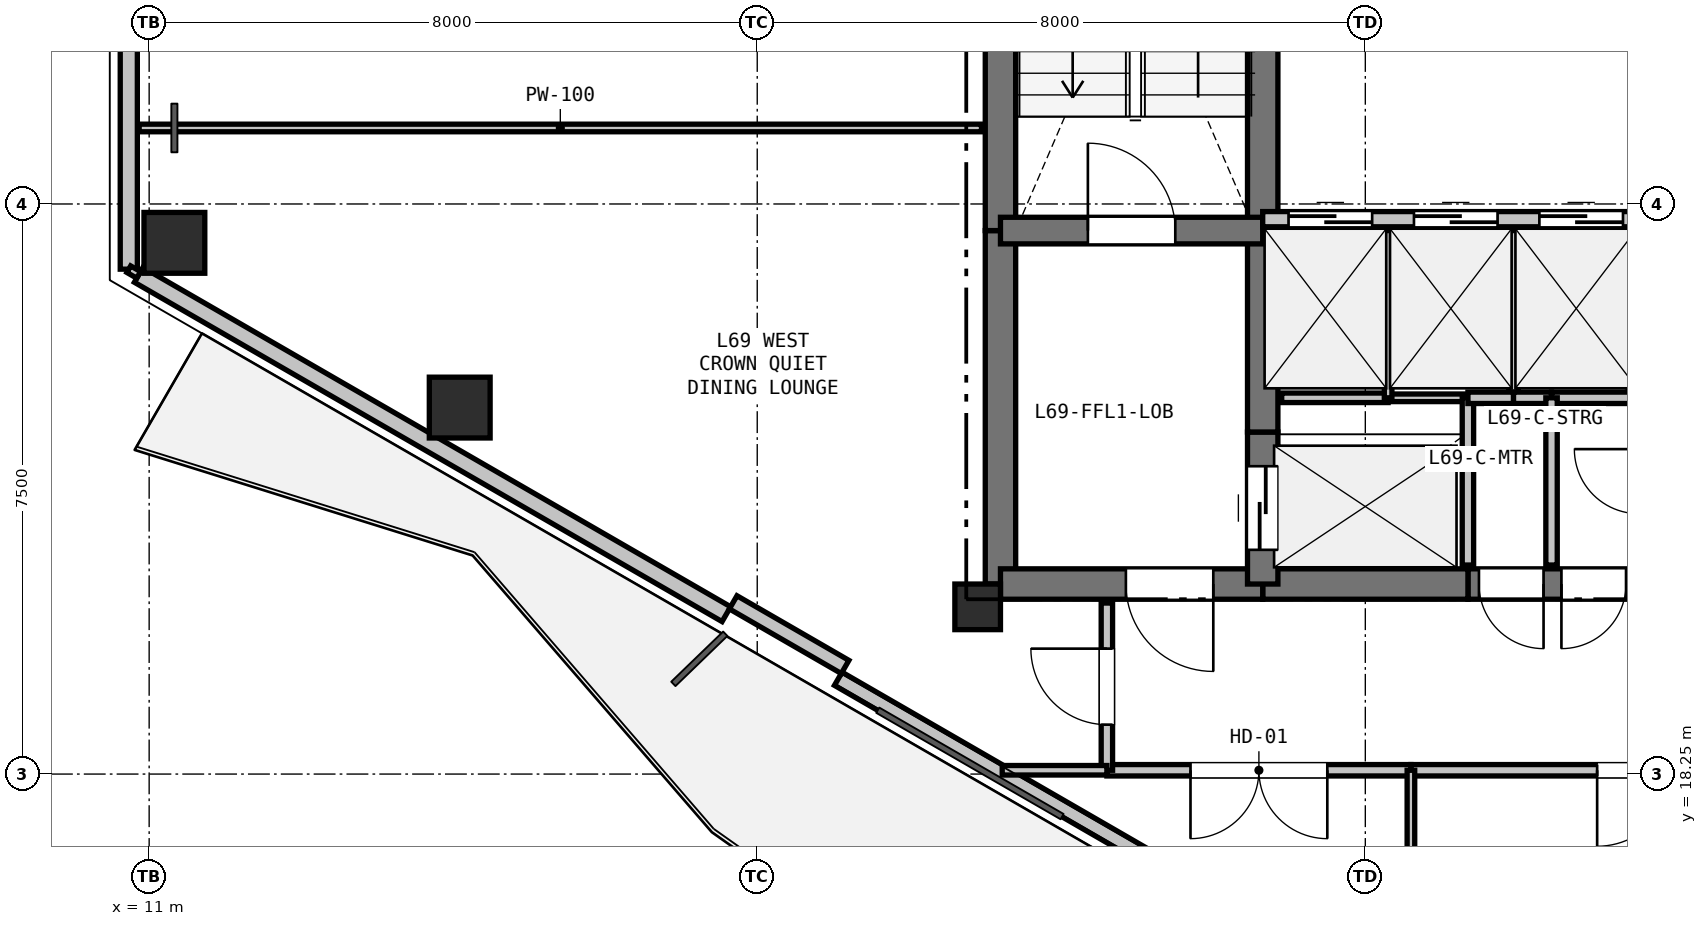
"""IFC4 building model, lengths in metres.
Left out: names, types, materials, properties, quantities, classifications, styles, units other than length and angle.
Written with IfcOpenShell. Run it as: python <this file> out.ifc"""

import sys

from ifc_helpers import new_model, si_unit, direction, frame, frame_2d, origin, origin_2d, place, context, subcontext, project, spatial, rectangle, hollow_rectangle, extrude, element, fill, save


model = new_model("IFC4")
c1 = context("Model", 3, precision=1e-05, world=origin(), true_north=direction((0.0, 1.0)))
c2 = subcontext(c1, "Body", "Model", "MODEL_VIEW")
j1 = project(units=[si_unit("LENGTHUNIT", "METRE"), si_unit("PLANEANGLEUNIT", "RADIAN")], contexts=[c1])
p1 = place(None, origin())
s1 = spatial("IfcSite", under=j1, at=p1, CompositionType="ELEMENT")
p2 = place(p1, origin())
s2 = spatial("IfcBuilding", under=s1, at=p2, CompositionType="ELEMENT")
p3 = place(p2, frame((0.0, 0.0, 246.3)))
s3 = spatial("IfcBuildingStorey", under=s2, at=p3, CompositionType="ELEMENT", Elevation=246.3)
p4 = place(p3, frame((21.9, 20.45, 0.0), z_axis=(0.0, 0.0, 1.0), x_axis=(1.0, 0.0, 0.0)))
e1 = element("IfcColumn", 1, at=p4, inside=s3, PredefinedType="COLUMN", context=c2, shape_type="SweptSolid", body=[
    extrude(rectangle(XDim=0.6, YDim=0.6, at=origin_2d()), origin(), (0.0, 0.0, 1.0), 3.3),
])
for number, where, z_axis, x_axis in (
    (2, (15.086, 23.072, 0.0), (0.0, 0.0, 1.0), (1.0, 0.0, 0.0)),
    (3, (11.332, 25.239, 0.0), (0.0, 0.0, 1.0), (1.0, 0.0, 0.0)),
):
    element("IfcColumn", number, at=place(p3, frame(where, z_axis=z_axis, x_axis=x_axis)), inside=s3, PredefinedType="COLUMN", context=c2, shape_type="SweptSolid", body=[
        extrude(hollow_rectangle(XDim=0.8, YDim=0.8, WallThickness=0.025, at=origin_2d()), origin(), (0.0, 0.0, 1.0), 3.3),
    ])
p5 = place(p3, frame((10.732, 24.892, 0.0), z_axis=(0.0, 0.0, 1.0), x_axis=(0.0, 1.0, 0.0)))
e4 = element("IfcWall", 4, at=p5, inside=s3, PredefinedType="SOLIDWALL", context=c2, shape_type="SweptSolid", body=[
    extrude(rectangle(XDim=3.715, YDim=0.225, at=frame_2d((1.858, 0.0))), origin(), (0.0, 0.0, 1.0), 2.64),
])
p6 = place(p3, frame((27.191, 15.389, 0.0), z_axis=(0.0, 0.0, 1.0), x_axis=(-0.866019557082, 0.500010126649, 0.0)))
e5 = element("IfcWall", 5, at=p6, inside=s3, PredefinedType="PARAPET", context=c2, shape_type="SweptSolid", body=[
    extrude(rectangle(XDim=8.228, YDim=0.2, at=frame_2d((4.114, 0.0))), origin(), (0.0, 0.0, 1.0), 0.2),
])
p7 = place(p3, frame((18.594, 20.354, 0.0), z_axis=(0.0, 0.0, 1.0), x_axis=(-0.866026655105, 0.499997832642, 0.0)))
e6 = element("IfcWall", 6, at=p7, inside=s3, PredefinedType="SOLIDWALL", context=c2, shape_type="SweptSolid", body=[
    extrude(rectangle(XDim=8.928, YDim=0.225, at=frame_2d((4.464, 0.0))), origin(), (0.0, 0.0, 1.0), 2.64),
])
p8 = place(p3, frame((20.156, 19.659, 0.0), z_axis=(0.0, 0.0, 1.0), x_axis=(-0.866025371046, 0.500000056704, 0.0)))
e7 = element("IfcWall", 7, at=p8, inside=s3, PredefinedType="PARAPET", context=c2, shape_type="SweptSolid", body=[
    extrude(rectangle(XDim=1.7, YDim=0.2, at=frame_2d((0.85, 0.0))), origin(), (0.0, 0.0, 1.0), 2.64),
])
p9 = place(p3, frame((22.2, 20.75, 0.0), z_axis=(0.0, 0.0, 1.0), x_axis=(0.0, 1.0, 0.0)))
e8 = element("IfcWall", 8, at=p9, inside=s3, PredefinedType="SHEAR", context=c2, shape_type="SweptSolid", body=[
    extrude(rectangle(XDim=4.65, YDim=0.4, at=frame_2d((2.325, 0.0))), origin(), (0.0, 0.0, 1.0), 3.02),
])
p10 = place(p3, frame((22.2, 25.4, 0.0), z_axis=(0.0, 0.0, 1.0), x_axis=(0.0, 1.0, 0.0)))
e9 = element("IfcWall", 9, at=p10, inside=s3, PredefinedType="SHEAR", context=c2, shape_type="SweptSolid", body=[
    extrude(rectangle(XDim=7.35, YDim=0.4, at=frame_2d((3.675, 0.0))), origin(), (0.0, 0.0, 1.0), 3.02),
])
p11 = place(p3, frame((30.6, 20.75, 0.0), z_axis=(0.0, 0.0, 1.0), x_axis=(-1.0, 0.0, 0.0)))
e10 = element("IfcWall", 10, at=p11, inside=s3, PredefinedType="SHEAR", context=c2, shape_type="SweptSolid", body=[
    extrude(rectangle(XDim=2.25, YDim=0.4, at=frame_2d((1.125, 0.0))), origin(), (0.0, 0.0, 1.0), 3.02),
])
p12 = place(p11, frame((1.255, 0.0, 0.0)))
e11 = element("IfcOpeningElement", 11, at=p12, cuts=e10, PredefinedType="OPENING", context=c2, shape_type="SweptSolid", body=[
    extrude(rectangle(XDim=0.85, YDim=2.1, at=frame_2d((0.425, 1.05))), frame((0.0, 0.21, 0.0), z_axis=(0.0, -1.0, 0.0), x_axis=(1.0, 0.0, 0.0)), (0.0, 0.0, 1.0), 0.42),
])
p13 = place(p11, frame((0.17, 0.0, 0.0)))
e12 = element("IfcOpeningElement", 12, at=p13, cuts=e10, PredefinedType="OPENING", context=c2, shape_type="SweptSolid", body=[
    extrude(rectangle(XDim=0.85, YDim=2.1, at=frame_2d((0.425, 1.05))), frame((0.0, 0.21, 0.0), z_axis=(0.0, -1.0, 0.0), x_axis=(1.0, 0.0, 0.0)), (0.0, 0.0, 1.0), 0.42),
])
p14 = place(p3, frame((28.35, 20.75, 0.0), z_axis=(0.0, 0.0, 1.0), x_axis=(-1.0, 0.0, 0.0)))
e13 = element("IfcWall", 13, at=p14, inside=s3, PredefinedType="SHEAR", context=c2, shape_type="SweptSolid", body=[
    extrude(rectangle(XDim=2.7, YDim=0.4, at=frame_2d((1.35, 0.0))), origin(), (0.0, 0.0, 1.0), 3.02),
])
p15 = place(p3, frame((25.65, 20.75, 0.0), z_axis=(0.0, 0.0, 1.0), x_axis=(-1.0, 0.0, 0.0)))
e14 = element("IfcWall", 14, at=p15, inside=s3, PredefinedType="SHEAR", context=c2, shape_type="SweptSolid", body=[
    extrude(rectangle(XDim=3.45, YDim=0.4, at=frame_2d((1.725, 0.0))), origin(), (0.0, 0.0, 1.0), 3.02),
])
p16 = place(p15, frame((0.65, 0.0, 0.0)))
e15 = element("IfcOpeningElement", 15, at=p16, cuts=e14, PredefinedType="OPENING", context=c2, shape_type="SweptSolid", body=[
    extrude(rectangle(XDim=1.15, YDim=2.15, at=frame_2d((0.575, 1.075))), frame((0.0, 0.21, 0.0), z_axis=(0.0, -1.0, 0.0), x_axis=(1.0, 0.0, 0.0)), (0.0, 0.0, 1.0), 0.42),
])
p17 = place(p3, frame((25.65, 20.75, 0.0), z_axis=(0.0, 0.0, 1.0), x_axis=(0.0, 1.0, 0.0)))
e16 = element("IfcWall", 16, at=p17, inside=s3, PredefinedType="SHEAR", context=c2, shape_type="SweptSolid", body=[
    extrude(rectangle(XDim=2.0, YDim=0.4, at=frame_2d((1.0, 0.0))), origin(), (0.0, 0.0, 1.0), 3.02),
])
p18 = place(p17, frame((0.45, 0.0, 0.0)))
e17 = element("IfcOpeningElement", 17, at=p18, cuts=e16, PredefinedType="OPENING", context=c2, shape_type="SweptSolid", body=[
    extrude(rectangle(XDim=1.1, YDim=2.15, at=frame_2d((0.55, 1.075))), frame((0.0, 0.21, 0.0), z_axis=(0.0, -1.0, 0.0), x_axis=(1.0, 0.0, 0.0)), (0.0, 0.0, 1.0), 0.42),
])
p19 = place(p3, frame((25.65, 22.75, 0.0), z_axis=(0.0, 0.0, 1.0), x_axis=(0.0, 1.0, 0.0)))
e18 = element("IfcWall", 18, at=p19, inside=s3, PredefinedType="SHEAR", context=c2, shape_type="SweptSolid", body=[
    extrude(rectangle(XDim=2.8, YDim=0.4, at=frame_2d((1.4, 0.0))), origin(), (0.0, 0.0, 1.0), 3.02),
])
p20 = place(p3, frame((25.65, 25.55, 0.0), z_axis=(0.0, 0.0, 1.0), x_axis=(0.0, 1.0, 0.0)))
e19 = element("IfcWall", 19, at=p20, inside=s3, PredefinedType="SHEAR", context=c2, shape_type="SweptSolid", body=[
    extrude(rectangle(XDim=2.4, YDim=0.4, at=frame_2d((1.2, 0.0))), origin(), (0.0, 0.0, 1.0), 3.02),
])
p21 = place(p3, frame((22.2, 25.4, 0.0), z_axis=(0.0, 0.0, 1.0), x_axis=(1.0, 0.0, 0.0)))
e20 = element("IfcWall", 20, at=p21, inside=s3, PredefinedType="SHEAR", context=c2, shape_type="SweptSolid", body=[
    extrude(rectangle(XDim=3.45, YDim=0.35, at=frame_2d((1.725, 0.0))), origin(), (0.0, 0.0, 1.0), 3.02),
])
p22 = place(p21, frame((1.15, 0.0, 0.0)))
e21 = element("IfcOpeningElement", 21, at=p22, cuts=e20, PredefinedType="OPENING", context=c2, shape_type="SweptSolid", body=[
    extrude(rectangle(XDim=1.15, YDim=2.15, at=frame_2d((0.575, 1.075))), frame((0.0, 0.185, 0.0), z_axis=(0.0, -1.0, 0.0), x_axis=(1.0, 0.0, 0.0)), (0.0, 0.0, 1.0), 0.37),
])
p23 = place(p3, frame((25.65, 25.55, 0.0), z_axis=(0.0, 0.0, 1.0), x_axis=(1.0, 0.0, 0.0)))
e22 = element("IfcWall", 22, at=p23, inside=s3, PredefinedType="PARTITIONING", context=c2, shape_type="SweptSolid", body=[
    extrude(rectangle(XDim=4.95, YDim=0.2, at=frame_2d((2.475, 0.0))), origin(), (0.0, 0.0, 1.0), 3.02),
])
p24 = place(p23, frame((0.34, 0.0, 0.0)))
e23 = element("IfcOpeningElement", 23, at=p24, cuts=e22, PredefinedType="OPENING", context=c2, shape_type="SweptSolid", body=[
    extrude(rectangle(XDim=1.1, YDim=2.15, at=frame_2d((0.55, 1.075))), frame((0.0, 0.11, 0.0), z_axis=(0.0, -1.0, 0.0), x_axis=(1.0, 0.0, 0.0)), (0.0, 0.0, 1.0), 0.22),
])
p25 = place(p23, frame((1.99, 0.0, 0.0)))
e24 = element("IfcOpeningElement", 24, at=p25, cuts=e22, PredefinedType="OPENING", context=c2, shape_type="SweptSolid", body=[
    extrude(rectangle(XDim=1.1, YDim=2.15, at=frame_2d((0.55, 1.075))), frame((0.0, 0.11, 0.0), z_axis=(0.0, -1.0, 0.0), x_axis=(1.0, 0.0, 0.0)), (0.0, 0.0, 1.0), 0.22),
])
p26 = place(p23, frame((3.64, 0.0, 0.0)))
e25 = element("IfcOpeningElement", 25, at=p26, cuts=e22, PredefinedType="OPENING", context=c2, shape_type="SweptSolid", body=[
    extrude(rectangle(XDim=1.1, YDim=2.15, at=frame_2d((0.55, 1.075))), frame((0.0, 0.11, 0.0), z_axis=(0.0, -1.0, 0.0), x_axis=(1.0, 0.0, 0.0)), (0.0, 0.0, 1.0), 0.22),
])
p27 = place(p3, frame((25.9, 23.2, 0.0), z_axis=(0.0, 0.0, 1.0), x_axis=(1.0, 0.0, 0.0)))
e26 = element("IfcWall", 26, at=p27, inside=s3, PredefinedType="PARTITIONING", context=c2, shape_type="SweptSolid", body=[
    extrude(rectangle(XDim=1.4, YDim=0.125, at=frame_2d((0.7, 0.0))), origin(), (0.0, 0.0, 1.0), 3.02),
])
p28 = place(p3, frame((27.3, 23.2, 0.0), z_axis=(0.0, 0.0, 1.0), x_axis=(1.0, 0.0, 0.0)))
e27 = element("IfcWall", 27, at=p28, inside=s3, PredefinedType="PARTITIONING", context=c2, shape_type="SweptSolid", body=[
    extrude(rectangle(XDim=1.05, YDim=0.1, at=frame_2d((0.525, 0.0))), origin(), (0.0, 0.0, 1.0), 3.02),
])
p29 = place(p3, frame((28.35, 23.2, 0.0), z_axis=(0.0, 0.0, 1.0), x_axis=(0.0, -1.0, 0.0)))
e28 = element("IfcWall", 28, at=p29, inside=s3, PredefinedType="PARTITIONING", context=c2, shape_type="SweptSolid", body=[
    extrude(rectangle(XDim=2.2, YDim=0.15, at=frame_2d((1.1, 0.0))), origin(), (0.0, 0.0, 1.0), 3.02),
])
p30 = place(p3, frame((27.3, 25.4, 0.0), z_axis=(0.0, 0.0, 1.0), x_axis=(0.0, -1.0, 0.0)))
e29 = element("IfcWall", 29, at=p30, inside=s3, PredefinedType="PARTITIONING", context=c2, shape_type="SweptSolid", body=[
    extrude(rectangle(XDim=2.2, YDim=0.1, at=frame_2d((1.1, 0.0))), origin(), (0.0, 0.0, 1.0), 3.02),
])
p31 = place(p3, frame((28.95, 25.4, 0.0), z_axis=(0.0, 0.0, 1.0), x_axis=(0.0, -1.0, 0.0)))
e30 = element("IfcWall", 30, at=p31, inside=s3, PredefinedType="PARTITIONING", context=c2, shape_type="SweptSolid", body=[
    extrude(rectangle(XDim=2.2, YDim=0.125, at=frame_2d((1.1, 0.0))), origin(), (0.0, 0.0, 1.0), 3.02),
])
p32 = place(p3, frame((28.95, 23.2, 0.0), z_axis=(0.0, 0.0, 1.0), x_axis=(-1.0, 0.0, 0.0)))
e31 = element("IfcWall", 31, at=p32, inside=s3, PredefinedType="PARTITIONING", context=c2, shape_type="SweptSolid", body=[
    extrude(rectangle(XDim=0.6, YDim=0.15, at=frame_2d((0.3, 0.0))), origin(), (0.0, 0.0, 1.0), 3.02),
])
p33 = place(p3, frame((30.6, 23.2, 0.0), z_axis=(0.0, 0.0, 1.0), x_axis=(-1.0, 0.0, 0.0)))
e32 = element("IfcWall", 32, at=p33, inside=s3, PredefinedType="PARTITIONING", context=c2, shape_type="SweptSolid", body=[
    extrude(rectangle(XDim=1.15, YDim=0.15, at=frame_2d((0.575, 0.0))), origin(), (0.0, 0.0, 1.0), 3.02),
])
p34 = place(p3, frame((29.45, 23.2, 0.0), z_axis=(0.0, 0.0, 1.0), x_axis=(-1.0, 0.0, 0.0)))
e33 = element("IfcWall", 33, at=p34, inside=s3, PredefinedType="PARTITIONING", context=c2, shape_type="SweptSolid", body=[
    extrude(rectangle(XDim=0.5, YDim=0.15, at=frame_2d((0.25, 0.0))), origin(), (0.0, 0.0, 1.0), 3.02),
])
p35 = place(p3, frame((33.5, 18.3, 0.0), z_axis=(0.0, 0.0, 1.0), x_axis=(-1.0, 0.0, 0.0)))
e34 = element("IfcWall", 34, at=p35, inside=s3, PredefinedType="PARTITIONING", context=c2, shape_type="SweptSolid", body=[
    extrude(rectangle(XDim=5.9, YDim=0.15, at=frame_2d((2.95, 0.0))), origin(), (0.0, 0.0, 1.0), 3.02),
])
p36 = place(p35, frame((2.45, 0.0, 0.0)))
e35 = element("IfcOpeningElement", 35, at=p36, cuts=e34, PredefinedType="OPENING", context=c2, shape_type="SweptSolid", body=[
    extrude(rectangle(XDim=1.0, YDim=2.15, at=frame_2d((0.5, 1.075))), frame((0.0, 0.085, 0.0), z_axis=(0.0, -1.0, 0.0), x_axis=(1.0, 0.0, 0.0)), (0.0, 0.0, 1.0), 0.17),
])
p37 = place(p3, frame((27.6, 18.3, 0.0), z_axis=(0.0, 0.0, 1.0), x_axis=(-1.0, 0.0, 0.0)))
e36 = element("IfcWall", 36, at=p37, inside=s3, PredefinedType="PARTITIONING", context=c2, shape_type="SweptSolid", body=[
    extrude(rectangle(XDim=4.0, YDim=0.15, at=frame_2d((2.0, 0.0))), origin(), (0.0, 0.0, 1.0), 2.365),
])
p38 = place(p37, frame((1.1, 0.0, 0.0)))
e37 = element("IfcOpeningElement", 37, at=p38, cuts=e36, PredefinedType="OPENING", context=c2, shape_type="SweptSolid", body=[
    extrude(rectangle(XDim=1.8, YDim=2.2, at=frame_2d((0.9, 1.1))), frame((0.0, 0.085, 0.0), z_axis=(0.0, -1.0, 0.0), x_axis=(1.0, 0.0, 0.0)), (0.0, 0.0, 1.0), 0.17),
])
p39 = place(p3, frame((23.6, 18.3, 0.0), z_axis=(0.0, 0.0, 1.0), x_axis=(0.0, 1.0, 0.0)))
e38 = element("IfcWall", 38, at=p39, inside=s3, PredefinedType="PARTITIONING", context=c2, shape_type="SweptSolid", body=[
    extrude(rectangle(XDim=2.2, YDim=0.15, at=frame_2d((1.1, 0.0))), origin(), (0.0, 0.0, 1.0), 2.468),
])
p40 = place(p39, frame((0.6, 0.0, 0.0)))
e39 = element("IfcOpeningElement", 39, at=p40, cuts=e38, PredefinedType="OPENING", context=c2, shape_type="SweptSolid", body=[
    extrude(rectangle(XDim=1.0, YDim=2.15, at=frame_2d((0.5, 1.075))), frame((0.0, 0.085, 0.0), z_axis=(0.0, -1.0, 0.0), x_axis=(1.0, 0.0, 0.0)), (0.0, 0.0, 1.0), 0.17),
])
p41 = place(p3, frame((29.45, 23.2, 0.0), z_axis=(0.0, 0.0, 1.0), x_axis=(0.0, -1.0, 0.0)))
e40 = element("IfcWall", 40, at=p41, inside=s3, PredefinedType="PARTITIONING", context=c2, shape_type="SweptSolid", body=[
    extrude(rectangle(XDim=2.2, YDim=0.15, at=frame_2d((1.1, 0.0))), origin(), (0.0, 0.0, 1.0), 3.02),
])
p42 = place(p3, frame((22.223, 18.3, 0.0), z_axis=(0.0, 0.0, 1.0), x_axis=(1.0, 0.0, 0.0)))
e41 = element("IfcWall", 41, at=p42, inside=s3, PredefinedType="PARTITIONING", context=c2, shape_type="SweptSolid", body=[
    extrude(rectangle(XDim=1.377, YDim=0.125, at=frame_2d((0.688, 0.0))), origin(), (0.0, 0.0, 1.0), 2.365),
])
p43 = place(p3, frame((27.6, 18.3, 0.0), z_axis=(0.0, 0.0, 1.0), x_axis=(0.0, -1.0, 0.0)))
e42 = element("IfcWall", 42, at=p43, inside=s3, PredefinedType="PARTITIONING", context=c2, shape_type="SweptSolid", body=[
    extrude(rectangle(XDim=2.795, YDim=0.1, at=frame_2d((1.398, 0.0))), origin(), (0.0, 0.0, 1.0), 2.365),
])
p44 = place(p3, frame((21.95, 26.75, 0.0), z_axis=(0.0, 0.0, 1.0), x_axis=(-1.0, 0.0, 0.0)))
e43 = element("IfcWall", 43, at=p44, inside=s3, PredefinedType="PARTITIONING", context=c2, shape_type="SweptSolid", body=[
    extrude(rectangle(XDim=11.082, YDim=0.1, at=frame_2d((5.541, 0.0))), origin(), (0.0, 0.0, 1.0), 2.545),
])
p45 = place(p3, frame((10.862, 24.817, 0.0), z_axis=(0.0, 0.0, 1.0), x_axis=(-0.866131372301, 0.499816412211, 0.0)))
e44 = element("IfcWall", 44, at=p45, inside=s3, PredefinedType="PARTITIONING", context=c2, shape_type="SweptSolid", body=[
    extrude(rectangle(XDim=0.15, YDim=0.1, at=frame_2d((0.075, 0.0))), origin(), (0.0, 0.0, 1.0), 3.02),
])
p46 = place(p24, origin())
e45 = element("IfcDoor", 45, at=p46, inside=s3, OperationType="SLIDING_TO_LEFT", PredefinedType="DOOR", context=c2, shape_type="SweptSolid", body=[
    extrude(rectangle(XDim=1.1, YDim=2.15, at=frame_2d((0.55, 1.075))), frame((0.0, 0.025, 0.0), z_axis=(0.0, -1.0, 0.0), x_axis=(1.0, 0.0, 0.0)), (0.0, 0.0, 1.0), 0.05),
])
fill(e23, e45)
p47 = place(p25, origin())
e46 = element("IfcDoor", 46, at=p47, inside=s3, OperationType="SLIDING_TO_LEFT", PredefinedType="DOOR", context=c2, shape_type="SweptSolid", body=[
    extrude(rectangle(XDim=1.1, YDim=2.15, at=frame_2d((0.55, 1.075))), frame((0.0, 0.025, 0.0), z_axis=(0.0, -1.0, 0.0), x_axis=(1.0, 0.0, 0.0)), (0.0, 0.0, 1.0), 0.05),
])
fill(e24, e46)
p48 = place(p26, origin())
e47 = element("IfcDoor", 47, at=p48, inside=s3, OperationType="SLIDING_TO_LEFT", PredefinedType="DOOR", context=c2, shape_type="SweptSolid", body=[
    extrude(rectangle(XDim=1.1, YDim=2.15, at=frame_2d((0.55, 1.075))), frame((0.0, 0.025, 0.0), z_axis=(0.0, -1.0, 0.0), x_axis=(1.0, 0.0, 0.0)), (0.0, 0.0, 1.0), 0.05),
])
fill(e25, e47)
p49 = place(p18, origin())
e48 = element("IfcDoor", 48, at=p49, inside=s3, OperationType="SLIDING_TO_LEFT", PredefinedType="DOOR", context=c2, shape_type="SweptSolid", body=[
    extrude(rectangle(XDim=1.1, YDim=2.15, at=frame_2d((0.55, 1.075))), frame((0.0, 0.025, 0.0), z_axis=(0.0, -1.0, 0.0), x_axis=(1.0, 0.0, 0.0)), (0.0, 0.0, 1.0), 0.05),
])
fill(e17, e48)
p50 = place(p22, origin())
e49 = element("IfcDoor", 49, at=p50, inside=s3, OperationType="SINGLE_SWING_LEFT", PredefinedType="DOOR", context=c2, shape_type="SweptSolid", body=[
    extrude(rectangle(XDim=1.15, YDim=2.15, at=frame_2d((0.575, 1.075))), frame((0.0, 0.025, 0.0), z_axis=(0.0, -1.0, 0.0), x_axis=(1.0, 0.0, 0.0)), (0.0, 0.0, 1.0), 0.05),
])
fill(e21, e49)
p51 = place(p16, origin())
e50 = element("IfcDoor", 50, at=p51, inside=s3, OperationType="SINGLE_SWING_LEFT", PredefinedType="DOOR", context=c2, shape_type="SweptSolid", body=[
    extrude(rectangle(XDim=1.15, YDim=2.15, at=frame_2d((0.575, 1.075))), frame((0.0, 0.025, 0.0), z_axis=(0.0, -1.0, 0.0), x_axis=(1.0, 0.0, 0.0)), (0.0, 0.0, 1.0), 0.05),
])
fill(e15, e50)
p52 = place(p12, origin())
e51 = element("IfcDoor", 51, at=p52, inside=s3, OperationType="SINGLE_SWING_LEFT", PredefinedType="DOOR", context=c2, shape_type="SweptSolid", body=[
    extrude(rectangle(XDim=0.85, YDim=2.1, at=frame_2d((0.425, 1.05))), frame((0.0, 0.025, 0.0), z_axis=(0.0, -1.0, 0.0), x_axis=(1.0, 0.0, 0.0)), (0.0, 0.0, 1.0), 0.05),
])
fill(e11, e51)
p53 = place(p13, origin())
e52 = element("IfcDoor", 52, at=p53, inside=s3, OperationType="SINGLE_SWING_RIGHT", PredefinedType="DOOR", context=c2, shape_type="SweptSolid", body=[
    extrude(rectangle(XDim=0.85, YDim=2.1, at=frame_2d((0.425, 1.05))), frame((0.0, 0.025, 0.0), z_axis=(0.0, -1.0, 0.0), x_axis=(1.0, 0.0, 0.0)), (0.0, 0.0, 1.0), 0.05),
])
fill(e12, e52)
p54 = place(p38, origin())
e53 = element("IfcDoor", 53, at=p54, inside=s3, OperationType="DOUBLE_DOOR_SINGLE_SWING", PredefinedType="DOOR", context=c2, shape_type="SweptSolid", body=[
    extrude(rectangle(XDim=1.8, YDim=2.2, at=frame_2d((0.9, 1.1))), frame((0.0, 0.025, 0.0), z_axis=(0.0, -1.0, 0.0), x_axis=(1.0, 0.0, 0.0)), (0.0, 0.0, 1.0), 0.05),
])
fill(e37, e53)
p55 = place(p36, origin())
e54 = element("IfcDoor", 54, at=p55, inside=s3, OperationType="SINGLE_SWING_RIGHT", PredefinedType="DOOR", context=c2, shape_type="SweptSolid", body=[
    extrude(rectangle(XDim=1.0, YDim=2.15, at=frame_2d((0.5, 1.075))), frame((0.0, 0.025, 0.0), z_axis=(0.0, -1.0, 0.0), x_axis=(1.0, 0.0, 0.0)), (0.0, 0.0, 1.0), 0.05),
])
fill(e35, e54)
p56 = place(p40, origin())
e55 = element("IfcDoor", 55, at=p56, inside=s3, OperationType="SINGLE_SWING_RIGHT", PredefinedType="DOOR", context=c2, shape_type="SweptSolid", body=[
    extrude(rectangle(XDim=1.0, YDim=2.15, at=frame_2d((0.5, 1.075))), frame((0.0, 0.025, 0.0), z_axis=(0.0, -1.0, 0.0), x_axis=(1.0, 0.0, 0.0)), (0.0, 0.0, 1.0), 0.05),
])
fill(e39, e55)
save(model, sys.argv[1])
